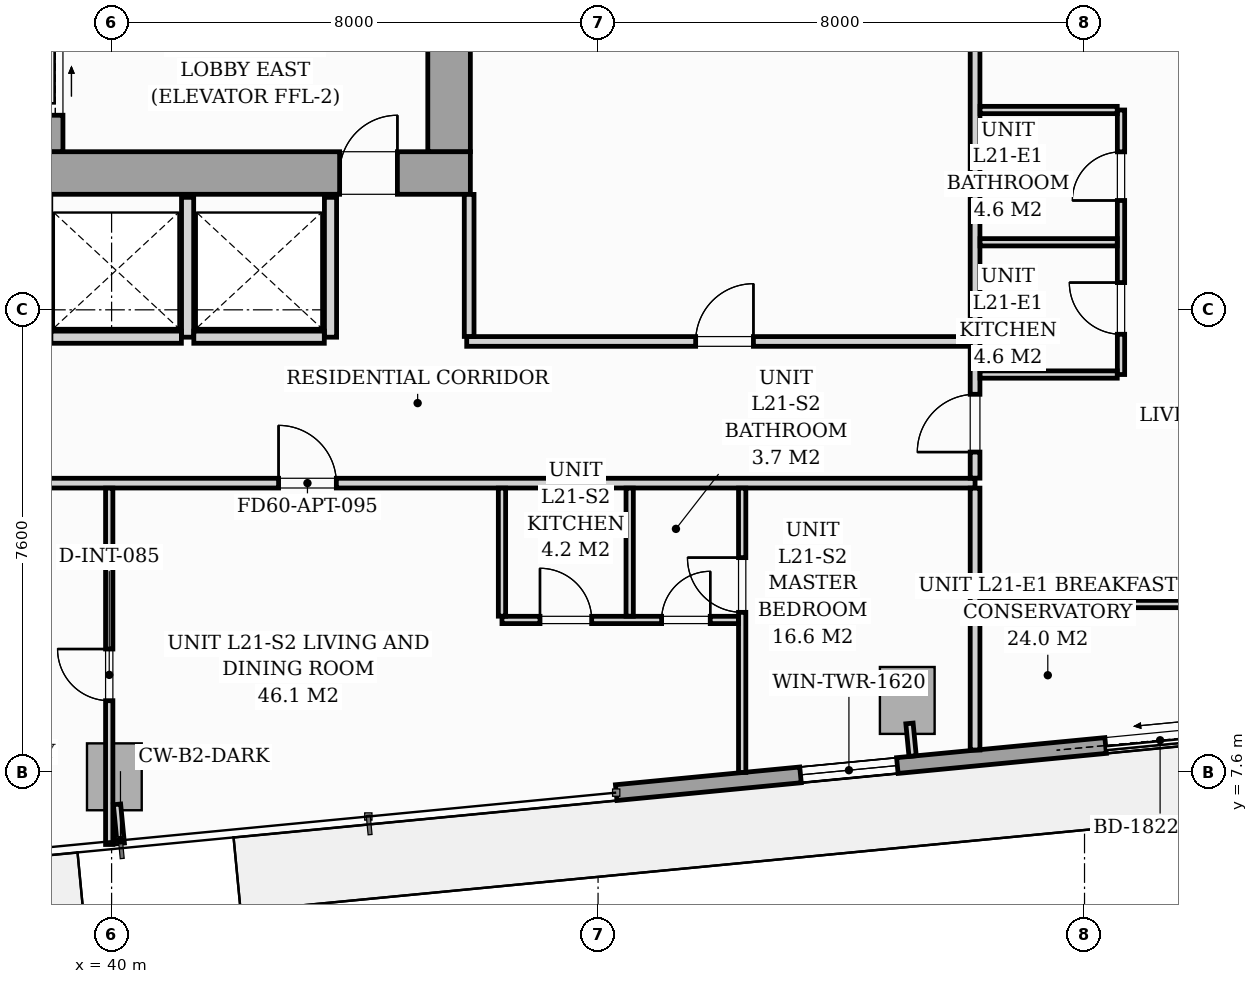
"""IFC4 building model, lengths in metres.
Left out: names, types, materials, properties, quantities, classifications, styles, units other than length and angle.
Written with IfcOpenShell. Run it as: python <this file> out.ifc"""

import sys

from ifc_helpers import new_model, si_unit, direction, frame, frame_2d, origin, origin_2d, place, context, subcontext, project, spatial, rectangle, i_section, extrude, source, transform, mapped, element, fill, save


model = new_model("IFC4")
c1 = context("Model", 3, precision=1e-05, world=origin(), true_north=direction((0.0, 1.0)))
c2 = subcontext(c1, "Body", "Model", "MODEL_VIEW")
j1 = project(units=[si_unit("LENGTHUNIT", "METRE"), si_unit("PLANEANGLEUNIT", "RADIAN")], contexts=[c1])
p1 = place(None, origin())
s1 = spatial("IfcSite", under=j1, at=p1, CompositionType="ELEMENT")
p2 = place(p1, origin())
s2 = spatial("IfcBuilding", under=s1, at=p2, CompositionType="ELEMENT")
p3 = place(p2, frame((0.0, 0.0, 77.8)))
s3 = spatial("IfcBuildingStorey", under=s2, at=p3, CompositionType="ELEMENT", Elevation=77.8)
m1 = source(origin(), c2, "Body", "SweptSolid", [
    extrude(i_section(OverallWidth=0.427, OverallDepth=0.483, WebThickness=0.051, FlangeThickness=0.082, FilletRadius=0.018, at=origin_2d()), origin(), (0.0, 0.0, 1.0), 3.196),
])
for number, where, z_axis, x_axis in (
    (1, (38.88, 17.4, 0.002), (0.0, 0.0, 1.0), (1.0, 0.0, 0.0)),
    (2, (45.6, 17.4, 0.002), (0.0, 0.0, 1.0), (1.0, 0.0, 0.0)),
):
    element("IfcColumn", number, at=place(p3, frame(where, z_axis=z_axis, x_axis=x_axis)), inside=s3, PredefinedType="PILASTER", context=c2, shape_type="MappedRepresentation", body=[
        mapped(m1, transform((0.0, 0.0, 0.0), scale=1.0)),
    ])
m2 = source(origin(), c2, "Body", "SweptSolid", [
    extrude(rectangle(XDim=0.9, YDim=1.1, at=origin_2d()), origin(), (0.0, 0.0, 1.0), 3.194),
])
for number, where, z_axis, x_axis in (
    (3, (40.045, 7.521, 0.004), (0.0, 0.0, 1.0), (0.995, 0.096, 0.0)),
    (4, (53.085, 8.776, 0.004), (0.0, 0.0, 1.0), (0.995, 0.096, 0.0)),
):
    element("IfcColumn", number, at=place(p3, frame(where, z_axis=z_axis, x_axis=x_axis)), inside=s3, PredefinedType="COLUMN", context=c2, shape_type="MappedRepresentation", body=[
        mapped(m2, transform((0.0, 0.0, 0.0), scale=1.0)),
    ])
p4 = place(p3, frame((67.32, 9.092, 0.0), z_axis=(0.0, 0.0, 1.0), x_axis=(-0.995396521236, -0.095842399342, 0.0)))
e5 = element("IfcWall", 5, at=p4, inside=s3, PredefinedType="STANDARD", context=c2, shape_type="SweptSolid", body=[
    extrude(rectangle(XDim=19.11, YDim=0.26, at=frame_2d((9.555, 0.0))), origin(), (0.0, 0.0, 1.0), 2.94),
])
p5 = place(p4, frame((9.224, 0.0, 0.0)))
e6 = element("IfcOpeningElement", 6, at=p5, cuts=e5, PredefinedType="OPENING", context=c2, shape_type="SweptSolid", body=[
    extrude(rectangle(XDim=1.8, YDim=2.06, at=frame_2d((0.9, 1.03))), frame((0.0, 0.14, 0.0), z_axis=(0.0, -1.0, 0.0), x_axis=(1.0, 0.0, 0.0)), (0.0, 0.0, 1.0), 0.28),
])
p6 = place(p4, frame((14.465, 0.0, 0.75)))
e7 = element("IfcOpeningElement", 7, at=p6, cuts=e5, PredefinedType="OPENING", context=c2, shape_type="SweptSolid", body=[
    extrude(rectangle(XDim=1.6, YDim=1.5, at=frame_2d((0.8, 0.75))), frame((0.0, 0.14, 0.0), z_axis=(0.0, -1.0, 0.0), x_axis=(1.0, 0.0, 0.0)), (0.0, 0.0, 1.0), 0.28),
])
p7 = place(p3, frame((26.1, 17.45, 0.0), z_axis=(0.0, 0.0, 1.0), x_axis=(1.0, 0.0, 0.0)))
e8 = element("IfcWall", 8, at=p7, inside=s3, PredefinedType="SHEAR", context=c2, shape_type="SweptSolid", body=[
    extrude(rectangle(XDim=19.8, YDim=0.7, at=frame_2d((9.9, 0.0))), origin(), (0.0, 0.0, 1.0), 3.2),
])
p8 = place(p7, frame((1.05, 0.0, 0.0)))
e9 = element("IfcOpeningElement", 9, at=p8, cuts=e8, PredefinedType="OPENING", context=c2, shape_type="SweptSolid", body=[
    extrude(rectangle(XDim=0.95, YDim=2.06, at=frame_2d((0.475, 1.03))), frame((0.0, 0.36, 0.0), z_axis=(0.0, -1.0, 0.0), x_axis=(1.0, 0.0, 0.0)), (0.0, 0.0, 1.0), 0.72),
])
p9 = place(p7, frame((9.48, 0.0, 0.0)))
e10 = element("IfcOpeningElement", 10, at=p9, cuts=e8, PredefinedType="OPENING", context=c2, shape_type="SweptSolid", body=[
    extrude(rectangle(XDim=0.85, YDim=2.0, at=frame_2d((0.425, 1.0))), frame((0.0, 0.36, 0.0), z_axis=(0.0, -1.0, 0.0), x_axis=(1.0, 0.0, 0.0)), (0.0, 0.0, 1.0), 0.72),
])
p10 = place(p7, frame((17.65, 0.0, 0.0)))
e11 = element("IfcOpeningElement", 11, at=p10, cuts=e8, PredefinedType="OPENING", context=c2, shape_type="SweptSolid", body=[
    extrude(rectangle(XDim=0.95, YDim=2.06, at=frame_2d((0.475, 1.03))), frame((0.0, 0.36, 0.0), z_axis=(0.0, -1.0, 0.0), x_axis=(1.0, 0.0, 0.0)), (0.0, 0.0, 1.0), 0.72),
])
p11 = place(p3, frame((45.55, 17.802, 0.0), z_axis=(0.0, 0.0, 1.0), x_axis=(0.0, 1.0, 0.0)))
e12 = element("IfcWall", 12, at=p11, inside=s3, PredefinedType="SHEAR", context=c2, shape_type="SweptSolid", body=[
    extrude(rectangle(XDim=5.796, YDim=0.7, at=frame_2d((2.898, 0.0))), origin(), (0.0, 0.0, 1.0), 3.2),
])
p12 = place(p3, frame((39.075, 17.802, 0.0), z_axis=(0.0, 0.0, 1.0), x_axis=(0.0, 1.0, 0.0)))
e13 = element("IfcWall", 13, at=p12, inside=s3, PredefinedType="SOLIDWALL", context=c2, shape_type="SweptSolid", body=[
    extrude(rectangle(XDim=2.646, YDim=0.25, at=frame_2d((1.323, 0.0))), origin(), (0.0, 0.0, 1.0), 3.2),
])
p13 = place(p12, frame((0.598, 0.0, 0.0)))
e14 = element("IfcOpeningElement", 14, at=p13, cuts=e13, PredefinedType="OPENING", context=c2, shape_type="SweptSolid", body=[
    extrude(rectangle(XDim=1.1, YDim=2.08, at=frame_2d((0.55, 1.04))), frame((0.0, 0.135, 0.0), z_axis=(0.0, -1.0, 0.0), x_axis=(1.0, 0.0, 0.0)), (0.0, 0.0, 1.0), 0.27),
])
for number, where, z_axis, x_axis in (
    (15, (41.25, 14.75, 0.0), (0.0, 0.0, 1.0), (0.0, 1.0, 0.0)),
    (16, (43.6, 14.75, 0.0), (0.0, 0.0, 1.0), (0.0, 1.0, 0.0)),
):
    element("IfcWall", number, at=place(p3, frame(where, z_axis=z_axis, x_axis=x_axis)), inside=s3, PredefinedType="PARTITIONING", context=c2, shape_type="SweptSolid", body=[
        extrude(rectangle(XDim=2.3, YDim=0.2, at=frame_2d((1.15, 0.0))), origin(), (0.0, 0.0, 1.0), 2.94),
    ])
for number, where, z_axis, x_axis in (
    (17, (39.002, 14.75, 0.0), (0.0, 0.0, 1.0), (1.0, 0.0, 0.0)),
    (18, (41.352, 14.75, 0.0), (0.0, 0.0, 1.0), (1.0, 0.0, 0.0)),
):
    element("IfcWall", number, at=place(p3, frame(where, z_axis=z_axis, x_axis=x_axis)), inside=s3, PredefinedType="PARTITIONING", context=c2, shape_type="SweptSolid", body=[
        extrude(rectangle(XDim=2.146, YDim=0.2, at=frame_2d((1.073, 0.0))), origin(), (0.0, 0.0, 1.0), 2.94),
    ])
p14 = place(p3, frame((16.6, 12.35, 0.0), z_axis=(0.0, 0.0, 1.0), x_axis=(1.0, 0.0, 0.0)))
e19 = element("IfcWall", 19, at=p14, inside=s3, PredefinedType="PARTITIONING", context=c2, shape_type="SweptSolid", body=[
    extrude(rectangle(XDim=37.6, YDim=0.16, at=frame_2d((18.8, 0.0))), origin(), (0.0, 0.0, 1.0), 2.94),
])
p15 = place(p14, frame((2.091, 0.0, 0.0)))
e20 = element("IfcOpeningElement", 20, at=p15, cuts=e19, PredefinedType="OPENING", context=c2, shape_type="SweptSolid", body=[
    extrude(rectangle(XDim=0.95, YDim=2.06, at=frame_2d((0.475, 1.03))), frame((0.0, 0.09, 0.0), z_axis=(0.0, -1.0, 0.0), x_axis=(1.0, 0.0, 0.0)), (0.0, 0.0, 1.0), 0.18),
])
p16 = place(p14, frame((26.146, 0.0, 0.0)))
e21 = element("IfcOpeningElement", 21, at=p16, cuts=e19, PredefinedType="OPENING", context=c2, shape_type="SweptSolid", body=[
    extrude(rectangle(XDim=0.95, YDim=2.06, at=frame_2d((0.475, 1.03))), frame((0.0, 0.09, 0.0), z_axis=(0.0, -1.0, 0.0), x_axis=(1.0, 0.0, 0.0)), (0.0, 0.0, 1.0), 0.18),
])
p17 = place(p3, frame((54.2, 7.961, 0.0), z_axis=(0.0, 0.0, 1.0), x_axis=(0.0, 1.0, 0.0)))
e22 = element("IfcWall", 22, at=p17, inside=s3, PredefinedType="PARTITIONING", context=c2, shape_type="SweptSolid", body=[
    extrude(rectangle(XDim=4.307, YDim=0.16, at=frame_2d((2.153, 0.0))), origin(), (0.0, 0.0, 1.0), 2.94),
])
p18 = place(p3, frame((54.2, 12.432, 0.0), z_axis=(0.0, 0.0, 1.0), x_axis=(0.0, 1.0, 0.0)))
e23 = element("IfcWall", 23, at=p18, inside=s3, PredefinedType="PARTITIONING", context=c2, shape_type="SweptSolid", body=[
    extrude(rectangle(XDim=15.095, YDim=0.16, at=frame_2d((7.548, 0.0))), origin(), (0.0, 0.0, 1.0), 2.94),
])
p19 = place(p18, frame((0.429, 0.0, 0.0)))
e24 = element("IfcOpeningElement", 24, at=p19, cuts=e23, PredefinedType="OPENING", context=c2, shape_type="SweptSolid", body=[
    extrude(rectangle(XDim=0.95, YDim=2.06, at=frame_2d((0.475, 1.03))), frame((0.0, 0.09, 0.0), z_axis=(0.0, -1.0, 0.0), x_axis=(1.0, 0.0, 0.0)), (0.0, 0.0, 1.0), 0.18),
])
p20 = place(p3, frame((50.37, 7.593, 0.0), z_axis=(0.0, 0.0, 1.0), x_axis=(0.0, 1.0, 0.0)))
e25 = element("IfcWall", 25, at=p20, inside=s3, PredefinedType="PARTITIONING", context=c2, shape_type="SweptSolid", body=[
    extrude(rectangle(XDim=4.676, YDim=0.12, at=frame_2d((2.338, 0.0))), origin(), (0.0, 0.0, 1.0), 2.94),
])
p21 = place(p20, frame((2.633, 0.0, 0.0)))
e26 = element("IfcOpeningElement", 26, at=p21, cuts=e25, PredefinedType="OPENING", context=c2, shape_type="SweptSolid", body=[
    extrude(rectangle(XDim=0.9, YDim=2.05, at=frame_2d((0.45, 1.025))), frame((0.0, 0.07, 0.0), z_axis=(0.0, -1.0, 0.0), x_axis=(1.0, 0.0, 0.0)), (0.0, 0.0, 1.0), 0.14),
])
p22 = place(p3, frame((46.42, 10.1, 0.0), z_axis=(0.0, 0.0, 1.0), x_axis=(1.0, 0.0, 0.0)))
e27 = element("IfcWall", 27, at=p22, inside=s3, PredefinedType="PARTITIONING", context=c2, shape_type="SweptSolid", body=[
    extrude(rectangle(XDim=3.888, YDim=0.12, at=frame_2d((1.944, 0.0))), origin(), (0.0, 0.0, 1.0), 2.94),
])
p23 = place(p22, frame((0.625, 0.0, 0.0)))
e28 = element("IfcOpeningElement", 28, at=p23, cuts=e27, PredefinedType="OPENING", context=c2, shape_type="SweptSolid", body=[
    extrude(rectangle(XDim=0.85, YDim=2.05, at=frame_2d((0.425, 1.025))), frame((0.0, 0.07, 0.0), z_axis=(0.0, -1.0, 0.0), x_axis=(1.0, 0.0, 0.0)), (0.0, 0.0, 1.0), 0.14),
])
p24 = place(p22, frame((2.625, 0.0, 0.0)))
e29 = element("IfcOpeningElement", 29, at=p24, cuts=e27, PredefinedType="OPENING", context=c2, shape_type="SweptSolid", body=[
    extrude(rectangle(XDim=0.8, YDim=2.02, at=frame_2d((0.4, 1.01))), frame((0.0, 0.07, 0.0), z_axis=(0.0, -1.0, 0.0), x_axis=(1.0, 0.0, 0.0)), (0.0, 0.0, 1.0), 0.14),
])
for number, where, z_axis, x_axis in (
    (30, (48.52, 10.162, 0.0), (0.0, 0.0, 1.0), (0.0, 1.0, 0.0)),
    (31, (46.42, 10.162, 0.0), (0.0, 0.0, 1.0), (0.0, 1.0, 0.0)),
):
    element("IfcWall", number, at=place(p3, frame(where, z_axis=z_axis, x_axis=x_axis)), inside=s3, PredefinedType="PARTITIONING", context=c2, shape_type="SweptSolid", body=[
        extrude(rectangle(XDim=2.106, YDim=0.12, at=frame_2d((1.053, 0.0))), origin(), (0.0, 0.0, 1.0), 2.94),
    ])
p25 = place(p3, frame((39.961, 6.407, 0.0), z_axis=(0.0, 0.0, 1.0), x_axis=(0.0, 1.0, 0.0)))
e32 = element("IfcWall", 32, at=p25, inside=s3, PredefinedType="PARTITIONING", context=c2, shape_type="SweptSolid", body=[
    extrude(rectangle(XDim=5.861, YDim=0.12, at=frame_2d((2.93, 0.0))), origin(), (0.0, 0.0, 1.0), 2.94),
])
p26 = place(p25, frame((2.365, 0.0, 0.0)))
e33 = element("IfcOpeningElement", 33, at=p26, cuts=e32, PredefinedType="OPENING", context=c2, shape_type="SweptSolid", body=[
    extrude(rectangle(XDim=0.85, YDim=2.05, at=frame_2d((0.425, 1.025))), frame((0.0, 0.07, 0.0), z_axis=(0.0, -1.0, 0.0), x_axis=(1.0, 0.0, 0.0)), (0.0, 0.0, 1.0), 0.14),
])
p27 = place(p3, frame((56.6, 14.136, 0.0), z_axis=(0.0, 0.0, 1.0), x_axis=(0.0, 1.0, 0.0)))
e34 = element("IfcWall", 34, at=p27, inside=s3, PredefinedType="PARTITIONING", context=c2, shape_type="SweptSolid", body=[
    extrude(rectangle(XDim=4.35, YDim=0.12, at=frame_2d((2.175, 0.0))), origin(), (0.0, 0.0, 1.0), 2.94),
])
p28 = place(p27, frame((0.662, 0.0, 0.0)))
e35 = element("IfcOpeningElement", 35, at=p28, cuts=e34, PredefinedType="OPENING", context=c2, shape_type="SweptSolid", body=[
    extrude(rectangle(XDim=0.85, YDim=2.05, at=frame_2d((0.425, 1.025))), frame((0.0, 0.07, 0.0), z_axis=(0.0, -1.0, 0.0), x_axis=(1.0, 0.0, 0.0)), (0.0, 0.0, 1.0), 0.14),
])
p29 = place(p27, frame((2.862, 0.0, 0.0)))
e36 = element("IfcOpeningElement", 36, at=p29, cuts=e34, PredefinedType="OPENING", context=c2, shape_type="SweptSolid", body=[
    extrude(rectangle(XDim=0.8, YDim=2.02, at=frame_2d((0.4, 1.01))), frame((0.0, 0.07, 0.0), z_axis=(0.0, -1.0, 0.0), x_axis=(1.0, 0.0, 0.0)), (0.0, 0.0, 1.0), 0.14),
])
for number, where, z_axis, x_axis in (
    (37, (54.282, 16.311, 0.0), (0.0, 0.0, 1.0), (1.0, 0.0, 0.0)),
    (38, (54.282, 14.136, 0.0), (0.0, 0.0, 1.0), (1.0, 0.0, 0.0)),
    (39, (54.282, 18.486, 0.0), (0.0, 0.0, 1.0), (1.0, 0.0, 0.0)),
):
    element("IfcWall", number, at=place(p3, frame(where, z_axis=z_axis, x_axis=x_axis)), inside=s3, PredefinedType="PARTITIONING", context=c2, shape_type="SweptSolid", body=[
        extrude(rectangle(XDim=2.256, YDim=0.12, at=frame_2d((1.128, 0.0))), origin(), (0.0, 0.0, 1.0), 2.94),
    ])
p30 = place(p3, frame((54.282, 10.362, 0.0), z_axis=(0.0, 0.0, 1.0), x_axis=(1.0, 0.0, 0.0)))
e40 = element("IfcWall", 40, at=p30, inside=s3, PredefinedType="PARTITIONING", context=c2, shape_type="SweptSolid", body=[
    extrude(rectangle(XDim=12.265, YDim=0.12, at=frame_2d((6.132, 0.0))), origin(), (0.0, 0.0, 1.0), 2.94),
])
p31 = place(p30, frame((4.853, 0.0, 0.0)))
e41 = element("IfcOpeningElement", 41, at=p31, cuts=e40, PredefinedType="OPENING", context=c2, shape_type="SweptSolid", body=[
    extrude(rectangle(XDim=0.85, YDim=2.05, at=frame_2d((0.425, 1.025))), frame((0.0, 0.07, 0.0), z_axis=(0.0, -1.0, 0.0), x_axis=(1.0, 0.0, 0.0)), (0.0, 0.0, 1.0), 0.14),
])
p32 = place(p3, frame((45.84, 14.68, 0.0), z_axis=(0.0, 0.0, 1.0), x_axis=(1.0, 0.0, 0.0)))
e42 = element("IfcWall", 42, at=p32, inside=s3, PredefinedType="PARTITIONING", context=c2, shape_type="SweptSolid", body=[
    extrude(rectangle(XDim=8.278, YDim=0.16, at=frame_2d((4.139, 0.0))), origin(), (0.0, 0.0, 1.0), 2.94),
])
p33 = place(p32, frame((3.765, 0.0, 0.0)))
e43 = element("IfcOpeningElement", 43, at=p33, cuts=e42, PredefinedType="OPENING", context=c2, shape_type="SweptSolid", body=[
    extrude(rectangle(XDim=0.95, YDim=2.06, at=frame_2d((0.475, 1.03))), frame((0.0, 0.09, 0.0), z_axis=(0.0, -1.0, 0.0), x_axis=(1.0, 0.0, 0.0)), (0.0, 0.0, 1.0), 0.18),
])
p34 = place(p3, frame((45.88, 14.762, 0.0), z_axis=(0.0, 0.0, 1.0), x_axis=(0.0, 1.0, 0.0)))
e44 = element("IfcWall", 44, at=p34, inside=s3, PredefinedType="PARTITIONING", context=c2, shape_type="SweptSolid", body=[
    extrude(rectangle(XDim=2.336, YDim=0.16, at=frame_2d((1.168, 0.0))), origin(), (0.0, 0.0, 1.0), 2.94),
])
p35 = place(p3, frame((40.089, 7.067, 0.0), z_axis=(0.0, 0.0, 1.0), x_axis=(0.095791766065, -0.995401395194, 0.0)))
e45 = element("IfcWall", 45, at=p35, inside=s3, PredefinedType="PARTITIONING", context=c2, shape_type="SweptSolid", body=[
    extrude(rectangle(XDim=0.645, YDim=0.12, at=frame_2d((0.322, 0.0))), origin(), (0.0, 0.0, 1.0), 2.94),
])
p36 = place(p3, frame((53.121, 8.398, 0.0), z_axis=(0.0, 0.0, 1.0), x_axis=(0.096179204763, -0.995364034196, 0.0)))
e46 = element("IfcWall", 46, at=p36, inside=s3, PredefinedType="PARTITIONING", context=c2, shape_type="SweptSolid", body=[
    extrude(rectangle(XDim=0.538, YDim=0.12, at=frame_2d((0.269, 0.0))), origin(), (0.0, 0.0, 1.0), 2.94),
])
m3 = source(origin(), c2, "Body", "SweptSolid", [
    extrude(rectangle(XDim=1.8, YDim=2.06, at=frame_2d((0.9, 1.03))), frame((0.0, 0.025, 0.0), z_axis=(0.0, -1.0, 0.0), x_axis=(1.0, 0.0, 0.0)), (0.0, 0.0, 1.0), 0.05),
])
p37 = place(p5, origin())
e47 = element("IfcDoor", 47, at=p37, inside=s3, OperationType="SLIDING_TO_RIGHT", PredefinedType="DOOR", context=c2, shape_type="MappedRepresentation", body=[
    mapped(m3, transform((0.0, 0.0, 0.0), scale=1.0)),
])
fill(e6, e47)
m4 = source(origin(), c2, "Body", "SweptSolid", [
    extrude(rectangle(XDim=1.6, YDim=1.5, at=frame_2d((0.8, 0.75))), frame((0.0, 0.03, 0.0), z_axis=(0.0, -1.0, 0.0), x_axis=(1.0, 0.0, 0.0)), (0.0, 0.0, 1.0), 0.06),
])
p38 = place(p6, origin())
e48 = element("IfcWindow", 48, at=p38, inside=s3, PartitioningType="SINGLE_PANEL", PredefinedType="WINDOW", context=c2, shape_type="MappedRepresentation", body=[
    mapped(m4, transform((0.0, 0.0, 0.0), scale=1.0)),
])
fill(e7, e48)
m5 = source(origin(), c2, "Body", "SweptSolid", [
    extrude(rectangle(XDim=0.95, YDim=2.06, at=frame_2d((0.475, 1.03))), frame((0.0, 0.025, 0.0), z_axis=(0.0, -1.0, 0.0), x_axis=(1.0, 0.0, 0.0)), (0.0, 0.0, 1.0), 0.05),
])
p39 = place(p10, origin())
e49 = element("IfcDoor", 49, at=p39, inside=s3, OperationType="SINGLE_SWING_RIGHT", PredefinedType="DOOR", context=c2, shape_type="MappedRepresentation", body=[
    mapped(m5, transform((0.0, 0.0, 0.0), scale=1.0)),
])
fill(e11, e49)
m6 = source(origin(), c2, "Body", "SweptSolid", [
    extrude(rectangle(XDim=1.1, YDim=2.08, at=frame_2d((0.55, 1.04))), frame((0.0, 0.025, 0.0), z_axis=(0.0, -1.0, 0.0), x_axis=(1.0, 0.0, 0.0)), (0.0, 0.0, 1.0), 0.05),
])
p40 = place(p13, origin())
e50 = element("IfcDoor", 50, at=p40, inside=s3, OperationType="SLIDING_TO_RIGHT", PredefinedType="DOOR", context=c2, shape_type="MappedRepresentation", body=[
    mapped(m6, transform((0.0, 0.0, 0.0), scale=1.0)),
])
fill(e14, e50)
m7 = source(origin(), c2, "Body", "SweptSolid", [
    extrude(rectangle(XDim=0.85, YDim=2.05, at=frame_2d((0.425, 1.025))), frame((0.0, 0.025, 0.0), z_axis=(0.0, -1.0, 0.0), x_axis=(1.0, 0.0, 0.0)), (0.0, 0.0, 1.0), 0.05),
])
p41 = place(p26, origin())
e51 = element("IfcDoor", 51, at=p41, inside=s3, OperationType="SINGLE_SWING_RIGHT", PredefinedType="DOOR", context=c2, shape_type="MappedRepresentation", body=[
    mapped(m7, transform((0.0, 0.0, 0.0), scale=1.0)),
])
fill(e33, e51)
m8 = source(origin(), c2, "Body", "SweptSolid", [
    extrude(rectangle(XDim=0.95, YDim=2.06, at=frame_2d((0.475, 1.03))), frame((0.0, 0.025, 0.0), z_axis=(0.0, -1.0, 0.0), x_axis=(1.0, 0.0, 0.0)), (0.0, 0.0, 1.0), 0.05),
])
p42 = place(p16, origin())
e52 = element("IfcDoor", 52, at=p42, inside=s3, OperationType="SINGLE_SWING_LEFT", PredefinedType="DOOR", context=c2, shape_type="MappedRepresentation", body=[
    mapped(m8, transform((0.0, 0.0, 0.0), scale=1.0)),
])
fill(e21, e52)
m9 = source(origin(), c2, "Body", "SweptSolid", [
    extrude(rectangle(XDim=0.9, YDim=2.05, at=frame_2d((0.45, 1.025))), frame((0.0, 0.025, 0.0), z_axis=(0.0, -1.0, 0.0), x_axis=(1.0, 0.0, 0.0)), (0.0, 0.0, 1.0), 0.05),
])
p43 = place(p21, origin())
e53 = element("IfcDoor", 53, at=p43, inside=s3, OperationType="SINGLE_SWING_RIGHT", PredefinedType="DOOR", context=c2, shape_type="MappedRepresentation", body=[
    mapped(m9, transform((0.0, 0.0, 0.0), scale=1.0)),
])
fill(e26, e53)
p44 = place(p23, origin())
e54 = element("IfcDoor", 54, at=p44, inside=s3, OperationType="SINGLE_SWING_LEFT", PredefinedType="DOOR", context=c2, shape_type="MappedRepresentation", body=[
    mapped(m7, transform((0.0, 0.0, 0.0), scale=1.0)),
])
fill(e28, e54)
m10 = source(origin(), c2, "Body", "SweptSolid", [
    extrude(rectangle(XDim=0.8, YDim=2.02, at=frame_2d((0.4, 1.01))), frame((0.0, 0.025, 0.0), z_axis=(0.0, -1.0, 0.0), x_axis=(1.0, 0.0, 0.0)), (0.0, 0.0, 1.0), 0.05),
])
p45 = place(p24, origin())
e55 = element("IfcDoor", 55, at=p45, inside=s3, OperationType="SINGLE_SWING_RIGHT", PredefinedType="DOOR", context=c2, shape_type="MappedRepresentation", body=[
    mapped(m10, transform((0.0, 0.0, 0.0), scale=1.0)),
])
fill(e29, e55)
p46 = place(p19, origin())
e56 = element("IfcDoor", 56, at=p46, inside=s3, OperationType="SINGLE_SWING_LEFT", PredefinedType="DOOR", context=c2, shape_type="MappedRepresentation", body=[
    mapped(m8, transform((0.0, 0.0, 0.0), scale=1.0)),
])
fill(e24, e56)
p47 = place(p28, origin())
e57 = element("IfcDoor", 57, at=p47, inside=s3, OperationType="SINGLE_SWING_RIGHT", PredefinedType="DOOR", context=c2, shape_type="MappedRepresentation", body=[
    mapped(m7, transform((0.0, 0.0, 0.0), scale=1.0)),
])
fill(e35, e57)
p48 = place(p29, origin())
e58 = element("IfcDoor", 58, at=p48, inside=s3, OperationType="SINGLE_SWING_LEFT", PredefinedType="DOOR", context=c2, shape_type="MappedRepresentation", body=[
    mapped(m10, transform((0.0, 0.0, 0.0), scale=1.0)),
])
fill(e36, e58)
p49 = place(p33, origin())
e59 = element("IfcDoor", 59, at=p49, inside=s3, OperationType="SINGLE_SWING_RIGHT", PredefinedType="DOOR", context=c2, shape_type="MappedRepresentation", body=[
    mapped(m8, transform((0.0, 0.0, 0.0), scale=1.0)),
])
fill(e43, e59)
save(model, sys.argv[1])
